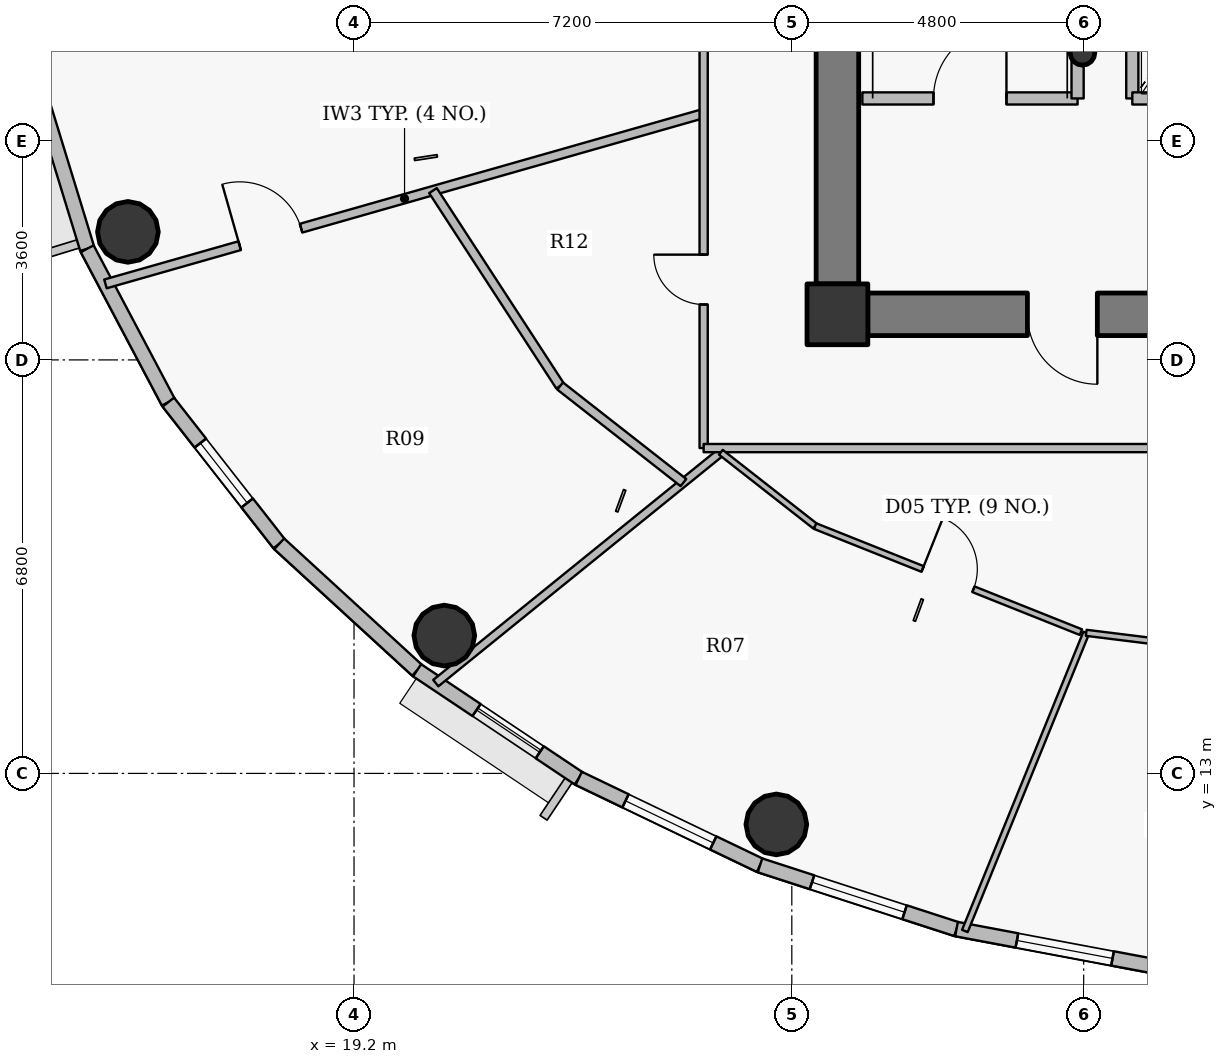
"""IFC4 building model, lengths in metres.
Left out: names, types, materials, properties, quantities, classifications, styles, units other than length and angle.
Written with IfcOpenShell. Run it as: python <this file> out.ifc"""

import sys

from ifc_helpers import new_model, si_unit, direction, frame, frame_2d, origin, origin_2d, place, context, subcontext, project, spatial, rectangle, hollow_circle, extrude, source, transform, mapped, element, fill, save


model = new_model("IFC4")
c1 = context("Model", 3, precision=1e-05, world=origin(), true_north=direction((0.0, 1.0)))
c2 = subcontext(c1, "Body", "Model", "MODEL_VIEW")
j1 = project(units=[si_unit("LENGTHUNIT", "METRE"), si_unit("PLANEANGLEUNIT", "RADIAN")], contexts=[c1])
p1 = place(None, origin())
s1 = spatial("IfcSite", under=j1, at=p1, CompositionType="ELEMENT")
p2 = place(p1, origin())
s2 = spatial("IfcBuilding", under=s1, at=p2, CompositionType="ELEMENT")
p3 = place(p2, frame((0.0, 0.0, 310.5)))
s3 = spatial("IfcBuildingStorey", under=s2, at=p3, CompositionType="ELEMENT", Elevation=310.5)
p4 = place(p3, frame((27.15, 20.55, 0.0), z_axis=(0.0, 0.0, 1.0), x_axis=(1.0, 0.0, 0.0)))
e1 = element("IfcColumn", 1, at=p4, inside=s3, PredefinedType="COLUMN", context=c2, shape_type="SweptSolid", body=[
    extrude(rectangle(XDim=1.0, YDim=1.0, at=origin_2d()), origin(), (0.0, 0.0, 1.0), 3.75),
])
p5 = place(p3, frame((31.18, 24.85, 0.0), z_axis=(0.0, 0.0, 1.0), x_axis=(1.0, 0.0, 0.0)))
e2 = element("IfcColumn", 2, at=p5, inside=s3, PredefinedType="COLUMN", context=c2, shape_type="SweptSolid", body=[
    extrude(hollow_circle(Radius=0.203, WallThickness=0.016, at=origin_2d()), origin(), (0.0, 0.0, 1.0), 3.75),
])
p6 = place(p3, frame((44.35, 20.55, 0.0), z_axis=(0.0, 0.0, 1.0), x_axis=(-1.0, 0.0, 0.0)))
e3 = element("IfcWall", 3, at=p6, inside=s3, PredefinedType="SHEAR", context=c2, shape_type="SweptSolid", body=[
    extrude(rectangle(XDim=16.7, YDim=0.7, at=frame_2d((8.35, 0.0))), origin(), (0.0, 0.0, 1.0), 3.05),
])
p7 = place(p6, frame((12.925, 0.0, 0.0)))
e4 = element("IfcOpeningElement", 4, at=p7, cuts=e3, PredefinedType="OPENING", context=c2, shape_type="SweptSolid", body=[
    extrude(rectangle(XDim=1.15, YDim=2.15, at=origin_2d()), frame((0.575, 0.36, 1.075), z_axis=(0.0, -1.0, 0.0), x_axis=(1.0, 0.0, 0.0)), (0.0, 0.0, 1.0), 0.72),
])
p8 = place(p6, frame((9.1, 0.0, 0.0)))
e5 = element("IfcOpeningElement", 5, at=p8, cuts=e3, PredefinedType="OPENING", context=c2, shape_type="SweptSolid", body=[
    extrude(rectangle(XDim=1.15, YDim=2.15, at=origin_2d()), frame((0.575, 0.36, 1.075), z_axis=(0.0, -1.0, 0.0), x_axis=(1.0, 0.0, 0.0)), (0.0, 0.0, 1.0), 0.72),
])
p9 = place(p3, frame((27.15, 21.05, 0.0), z_axis=(0.0, 0.0, 1.0), x_axis=(0.0, 1.0, 0.0)))
e6 = element("IfcWall", 6, at=p9, inside=s3, PredefinedType="SHEAR", context=c2, shape_type="SweptSolid", body=[
    extrude(rectangle(XDim=11.9, YDim=0.7, at=frame_2d((5.95, 0.0))), origin(), (0.0, 0.0, 1.0), 3.05),
])
for number, where, z_axis, x_axis in (
    (7, (15.481, 21.906, 0.0), (0.0, 0.0, 1.0), (1.0, 0.0, 0.0)),
    (8, (20.685, 15.267, 0.0), (0.0, 0.0, 1.0), (1.0, 0.0, 0.0)),
    (9, (26.146, 12.161, 0.0), (0.0, 0.0, 1.0), (1.0, 0.0, 0.0)),
):
    element("IfcColumn", number, at=place(p3, frame(where, z_axis=z_axis, x_axis=x_axis)), inside=s3, PredefinedType="COLUMN", context=c2, shape_type="SweptSolid", body=[
        extrude(hollow_circle(Radius=0.5, WallThickness=0.032, at=origin_2d()), origin(), (0.0, 0.0, 1.0), 3.75),
    ])
p10 = place(p3, frame((14.812, 21.628, 0.0), z_axis=(0.0, 0.0, 1.0), x_axis=(-0.2931213403, 0.956075248012, 0.0)))
e10 = element("IfcWall", 10, at=p10, inside=s3, PredefinedType="SOLIDWALL", context=c2, shape_type="SweptSolid", body=[
    extrude(rectangle(XDim=2.775, YDim=0.24, at=frame_2d((1.388, 0.0))), origin(), (0.0, 0.0, 1.0), 3.5),
])
p11 = place(p3, frame((16.146, 19.105, 0.0), z_axis=(0.0, 0.0, 1.0), x_axis=(-0.467628269026, 0.883925224218, 0.0)))
e11 = element("IfcWall", 11, at=p11, inside=s3, PredefinedType="SOLIDWALL", context=c2, shape_type="SweptSolid", body=[
    extrude(rectangle(XDim=2.854, YDim=0.24, at=frame_2d((1.427, 0.0))), origin(), (0.0, 0.0, 1.0), 3.5),
])
p12 = place(p3, frame((17.97, 16.775, 0.0), z_axis=(0.0, 0.0, 1.0), x_axis=(-0.616337186556, 0.787482363275, 0.0)))
e12 = element("IfcWall", 12, at=p12, inside=s3, PredefinedType="SOLIDWALL", context=c2, shape_type="SweptSolid", body=[
    extrude(rectangle(XDim=2.958, YDim=0.24, at=frame_2d((1.479, 0.0))), origin(), (0.0, 0.0, 1.0), 3.5),
])
p13 = place(p12, frame((0.854, 0.0, 0.9)))
e13 = element("IfcOpeningElement", 13, at=p13, cuts=e12, PredefinedType="OPENING", context=c2, shape_type="SweptSolid", body=[
    extrude(rectangle(XDim=1.25, YDim=1.65, at=origin_2d()), frame((0.625, 0.13, 0.825), z_axis=(0.0, -1.0, 0.0), x_axis=(1.0, 0.0, 0.0)), (0.0, 0.0, 1.0), 0.26),
])
p14 = place(p3, frame((20.238, 14.696, 0.0), z_axis=(0.0, 0.0, 1.0), x_axis=(-0.737068506972, 0.675818034703, 0.0)))
e14 = element("IfcWall", 14, at=p14, inside=s3, PredefinedType="SOLIDWALL", context=c2, shape_type="SweptSolid", body=[
    extrude(rectangle(XDim=3.077, YDim=0.24, at=frame_2d((1.539, 0.0))), origin(), (0.0, 0.0, 1.0), 3.5),
])
p15 = place(p3, frame((22.896, 12.918, 0.0), z_axis=(0.0, 0.0, 1.0), x_axis=(-0.831250592635, 0.55589787933, 0.0)))
e15 = element("IfcWall", 15, at=p15, inside=s3, PredefinedType="SOLIDWALL", context=c2, shape_type="SweptSolid", body=[
    extrude(rectangle(XDim=3.197, YDim=0.24, at=frame_2d((1.599, 0.0))), origin(), (0.0, 0.0, 1.0), 3.5),
])
p16 = place(p15, frame((0.772, 0.0, 0.9)))
e16 = element("IfcOpeningElement", 16, at=p16, cuts=e15, PredefinedType="OPENING", context=c2, shape_type="SweptSolid", body=[
    extrude(rectangle(XDim=1.25, YDim=1.65, at=origin_2d()), frame((0.625, 0.13, 0.825), z_axis=(0.0, -1.0, 0.0), x_axis=(1.0, 0.0, 0.0)), (0.0, 0.0, 1.0), 0.26),
])
p17 = place(p3, frame((25.877, 11.488, 0.0), z_axis=(0.0, 0.0, 1.0), x_axis=(-0.901573741254, 0.43262546051, 0.0)))
e17 = element("IfcWall", 17, at=p17, inside=s3, PredefinedType="SOLIDWALL", context=c2, shape_type="SweptSolid", body=[
    extrude(rectangle(XDim=3.307, YDim=0.24, at=frame_2d((1.653, 0.0))), origin(), (0.0, 0.0, 1.0), 3.5),
])
p18 = place(p17, frame((0.853, 0.0, 0.9)))
e18 = element("IfcOpeningElement", 18, at=p18, cuts=e17, PredefinedType="OPENING", context=c2, shape_type="SweptSolid", body=[
    extrude(rectangle(XDim=1.6, YDim=1.75, at=origin_2d()), frame((0.8, 0.13, 0.875), z_axis=(0.0, -1.0, 0.0), x_axis=(1.0, 0.0, 0.0)), (0.0, 0.0, 1.0), 0.26),
])
p19 = place(p3, frame((29.109, 10.44, 0.0), z_axis=(0.0, 0.0, 1.0), x_axis=(-0.95123136723, 0.308478339592, 0.0)))
e19 = element("IfcWall", 19, at=p19, inside=s3, PredefinedType="SOLIDWALL", context=c2, shape_type="SweptSolid", body=[
    extrude(rectangle(XDim=3.398, YDim=0.24, at=frame_2d((1.699, 0.0))), origin(), (0.0, 0.0, 1.0), 3.5),
])
p20 = place(p19, frame((0.899, 0.0, 0.9)))
e20 = element("IfcOpeningElement", 20, at=p20, cuts=e19, PredefinedType="OPENING", context=c2, shape_type="SweptSolid", body=[
    extrude(rectangle(XDim=1.6, YDim=1.75, at=origin_2d()), frame((0.8, 0.13, 0.875), z_axis=(0.0, -1.0, 0.0), x_axis=(1.0, 0.0, 0.0)), (0.0, 0.0, 1.0), 0.26),
])
p21 = place(p3, frame((32.511, 9.8, 0.0), z_axis=(0.0, 0.0, 1.0), x_axis=(-0.982782655757, 0.184765395959, 0.0)))
e21 = element("IfcWall", 21, at=p21, inside=s3, PredefinedType="SOLIDWALL", context=c2, shape_type="SweptSolid", body=[
    extrude(rectangle(XDim=3.462, YDim=0.24, at=frame_2d((1.731, 0.0))), origin(), (0.0, 0.0, 1.0), 3.5),
])
p22 = place(p21, frame((0.851, 0.0, 0.9)))
e22 = element("IfcOpeningElement", 22, at=p22, cuts=e21, PredefinedType="OPENING", context=c2, shape_type="SweptSolid", body=[
    extrude(rectangle(XDim=1.6, YDim=1.75, at=origin_2d()), frame((0.8, 0.13, 0.875), z_axis=(0.0, -1.0, 0.0), x_axis=(1.0, 0.0, 0.0)), (0.0, 0.0, 1.0), 0.26),
])
p23 = place(p3, frame((15.112, 21.05, 0.0), z_axis=(0.0, 0.0, 1.0), x_axis=(0.961740695875, 0.273961373004, 0.0)))
e23 = element("IfcWall", 23, at=p23, inside=s3, PredefinedType="PARTITIONING", context=c2, shape_type="SweptSolid", body=[
    extrude(rectangle(XDim=10.229, YDim=0.15, at=frame_2d((5.115, 0.0))), origin(), (0.0, 0.0, 1.0), 2.985),
])
p24 = place(p23, frame((2.295, 0.0, 0.0)))
e24 = element("IfcOpeningElement", 24, at=p24, cuts=e23, PredefinedType="OPENING", context=c2, shape_type="SweptSolid", body=[
    extrude(rectangle(XDim=1.05, YDim=2.15, at=origin_2d()), frame((0.525, 0.085, 1.075), z_axis=(0.0, -1.0, 0.0), x_axis=(1.0, 0.0, 0.0)), (0.0, 0.0, 1.0), 0.17),
])
p25 = place(p3, frame((20.499, 22.584, 0.0), z_axis=(0.0, 0.0, 1.0), x_axis=(0.545422512832, -0.838161250892, 0.0)))
e25 = element("IfcWall", 25, at=p25, inside=s3, PredefinedType="PARTITIONING", context=c2, shape_type="SweptSolid", body=[
    extrude(rectangle(XDim=3.834, YDim=0.15, at=frame_2d((1.917, 0.0))), origin(), (0.0, 0.0, 1.0), 3.5),
])
p26 = place(p3, frame((20.545, 14.485, 0.0), z_axis=(0.0, 0.0, 1.0), x_axis=(0.77715155867, 0.629313479004, 0.0)))
e26 = element("IfcWall", 26, at=p26, inside=s3, PredefinedType="PARTITIONING", context=c2, shape_type="SweptSolid", body=[
    extrude(rectangle(XDim=6.032, YDim=0.135, at=frame_2d((3.016, 0.0))), origin(), (0.0, 0.0, 1.0), 2.985),
])
p27 = place(p3, frame((22.59, 19.371, 0.0), z_axis=(0.0, 0.0, 1.0), x_axis=(0.78729093539, -0.616581692116, 0.0)))
e27 = element("IfcWall", 27, at=p27, inside=s3, PredefinedType="PARTITIONING", context=c2, shape_type="SweptSolid", body=[
    extrude(rectangle(XDim=2.576, YDim=0.15, at=frame_2d((1.288, 0.0))), origin(), (0.0, 0.0, 1.0), 3.035),
])
p28 = place(p3, frame((24.95, 18.35, 0.0), z_axis=(0.0, 0.0, 1.0), x_axis=(0.0, 1.0, 0.0)))
e28 = element("IfcWall", 28, at=p28, inside=s3, PredefinedType="PARTITIONING", context=c2, shape_type="SweptSolid", body=[
    extrude(rectangle(XDim=11.45, YDim=0.135, at=frame_2d((5.725, 0.0))), origin(), (0.0, 0.0, 1.0), 3.035),
])
p29 = place(p28, frame((7.931, 0.0, 0.0)))
e29 = element("IfcOpeningElement", 29, at=p29, cuts=e28, PredefinedType="OPENING", context=c2, shape_type="SweptSolid", body=[
    extrude(rectangle(XDim=1.05, YDim=2.15, at=origin_2d()), frame((0.525, 0.078, 1.075), z_axis=(0.0, -1.0, 0.0), x_axis=(1.0, 0.0, 0.0)), (0.0, 0.0, 1.0), 0.155),
])
p30 = place(p28, frame((2.361, 0.0, 0.0)))
e30 = element("IfcOpeningElement", 30, at=p30, cuts=e28, PredefinedType="OPENING", context=c2, shape_type="SweptSolid", body=[
    extrude(rectangle(XDim=0.82, YDim=2.1, at=origin_2d()), frame((0.41, 0.078, 1.05), z_axis=(0.0, -1.0, 0.0), x_axis=(1.0, 0.0, 0.0)), (0.0, 0.0, 1.0), 0.155),
])
p31 = place(p3, frame((24.95, 18.35, 0.0), z_axis=(0.0, 0.0, 1.0), x_axis=(1.0, 0.0, 0.0)))
e31 = element("IfcWall", 31, at=p31, inside=s3, PredefinedType="PARTITIONING", context=c2, shape_type="SweptSolid", body=[
    extrude(rectangle(XDim=19.311, YDim=0.135, at=frame_2d((9.655, 0.0))), origin(), (0.0, 0.0, 1.0), 3.035),
])
p32 = place(p31, frame((9.319, 0.0, 0.0)))
e32 = element("IfcOpeningElement", 32, at=p32, cuts=e31, PredefinedType="OPENING", context=c2, shape_type="SweptSolid", body=[
    extrude(rectangle(XDim=1.0, YDim=2.15, at=origin_2d()), frame((0.5, 0.078, 1.075), z_axis=(0.0, -1.0, 0.0), x_axis=(1.0, 0.0, 0.0)), (0.0, 0.0, 1.0), 0.155),
])
p33 = place(p3, frame((25.233, 18.281, 0.0), z_axis=(0.0, 0.0, 1.0), x_axis=(0.787345395334, -0.61651214785, 0.0)))
e33 = element("IfcWall", 33, at=p33, inside=s3, PredefinedType="PARTITIONING", context=c2, shape_type="SweptSolid", body=[
    extrude(rectangle(XDim=1.969, YDim=0.1, at=frame_2d((0.985, 0.0))), origin(), (0.0, 0.0, 1.0), 3.5),
])
p34 = place(p3, frame((26.783, 17.067, 0.0), z_axis=(0.0, 0.0, 1.0), x_axis=(0.928809047774, -0.370558703544, 0.0)))
e34 = element("IfcWall", 34, at=p34, inside=s3, PredefinedType="PARTITIONING", context=c2, shape_type="SweptSolid", body=[
    extrude(rectangle(XDim=4.706, YDim=0.1, at=frame_2d((2.353, 0.0))), origin(), (0.0, 0.0, 1.0), 3.035),
])
p35 = place(p34, frame((1.903, 0.0, 0.0)))
e35 = element("IfcOpeningElement", 35, at=p35, cuts=e34, PredefinedType="OPENING", context=c2, shape_type="SweptSolid", body=[
    extrude(rectangle(XDim=0.9, YDim=2.1, at=origin_2d()), frame((0.45, 0.06, 1.05), z_axis=(0.0, -1.0, 0.0), x_axis=(1.0, 0.0, 0.0)), (0.0, 0.0, 1.0), 0.12),
])
p36 = place(p3, frame((27.56, 24.1, 0.0), z_axis=(0.0, 0.0, 1.0), x_axis=(1.0, 0.0, 0.0)))
e36 = element("IfcWall", 36, at=p36, inside=s3, PredefinedType="PARTITIONING", context=c2, shape_type="SweptSolid", body=[
    extrude(rectangle(XDim=3.54, YDim=0.2, at=frame_2d((1.77, 0.0))), origin(), (0.0, 0.0, 1.0), 3.5),
])
p37 = place(p36, frame((1.17, 0.0, 0.0)))
e37 = element("IfcOpeningElement", 37, at=p37, cuts=e36, PredefinedType="OPENING", context=c2, shape_type="SweptSolid", body=[
    extrude(rectangle(XDim=1.2, YDim=2.15, at=origin_2d()), frame((0.6, 0.11, 1.075), z_axis=(0.0, -1.0, 0.0), x_axis=(1.0, 0.0, 0.0)), (0.0, 0.0, 1.0), 0.22),
])
p38 = place(p3, frame((29.246, 10.409, 0.0), z_axis=(0.0, 0.0, 1.0), x_axis=(0.377005355791, 0.926211078375, 0.0)))
e38 = element("IfcWall", 38, at=p38, inside=s3, PredefinedType="PARTITIONING", context=c2, shape_type="SweptSolid", body=[
    extrude(rectangle(XDim=5.294, YDim=0.1, at=frame_2d((2.647, 0.0))), origin(), (0.0, 0.0, 1.0), 2.985),
])
p39 = place(p3, frame((31.1, 24.1, 0.0), z_axis=(0.0, 0.0, 1.0), x_axis=(0.0, 1.0, 0.0)))
e39 = element("IfcWall", 39, at=p39, inside=s3, PredefinedType="PARTITIONING", context=c2, shape_type="SweptSolid", body=[
    extrude(rectangle(XDim=1.44, YDim=0.2, at=frame_2d((0.72, 0.0))), origin(), (0.0, 0.0, 1.0), 3.5),
])
p40 = place(p3, frame((31.242, 15.312, 0.0), z_axis=(0.0, 0.0, 1.0), x_axis=(0.992396501967, -0.123082016895, 0.0)))
e40 = element("IfcWall", 40, at=p40, inside=s3, PredefinedType="PARTITIONING", context=c2, shape_type="SweptSolid", body=[
    extrude(rectangle(XDim=4.794, YDim=0.1, at=frame_2d((2.397, 0.0))), origin(), (0.0, 0.0, 1.0), 3.035),
])
p41 = place(p40, frame((1.947, 0.0, 0.0)))
e41 = element("IfcOpeningElement", 41, at=p41, cuts=e40, PredefinedType="OPENING", context=c2, shape_type="SweptSolid", body=[
    extrude(rectangle(XDim=0.9, YDim=2.1, at=origin_2d()), frame((0.45, 0.06, 1.05), z_axis=(0.0, -1.0, 0.0), x_axis=(1.0, 0.0, 0.0)), (0.0, 0.0, 1.0), 0.12),
])
p42 = place(p3, frame((32.0, 24.1, 0.0), z_axis=(0.0, 0.0, 1.0), x_axis=(0.0, 1.0, 0.0)))
e42 = element("IfcWall", 42, at=p42, inside=s3, PredefinedType="PARTITIONING", context=c2, shape_type="SweptSolid", body=[
    extrude(rectangle(XDim=3.45, YDim=0.2, at=frame_2d((1.725, 0.0))), origin(), (0.0, 0.0, 1.0), 3.5),
])
p43 = place(p3, frame((32.0, 24.1, 0.0), z_axis=(0.0, 0.0, 1.0), x_axis=(1.0, 0.0, 0.0)))
e43 = element("IfcWall", 43, at=p43, inside=s3, PredefinedType="PARTITIONING", context=c2, shape_type="SweptSolid", body=[
    extrude(rectangle(XDim=1.9, YDim=0.2, at=frame_2d((0.95, 0.0))), origin(), (0.0, 0.0, 1.0), 3.085),
])
p44 = place(p43, frame((0.375, 0.0, 0.0)))
e44 = element("IfcOpeningElement", 44, at=p44, cuts=e43, PredefinedType="OPENING", context=c2, shape_type="SweptSolid", body=[
    extrude(rectangle(XDim=1.15, YDim=2.15, at=origin_2d()), frame((0.575, 0.11, 1.075), z_axis=(0.0, -1.0, 0.0), x_axis=(1.0, 0.0, 0.0)), (0.0, 0.0, 1.0), 0.22),
])
p45 = place(p3, frame((26.8, 21.04, 0.0), z_axis=(0.0, 0.0, 1.0), x_axis=(0.0, -1.0, 0.0)))
e45 = element("IfcWall", 45, at=p45, inside=s3, PredefinedType="PARTITIONING", context=c2, shape_type="SweptSolid", body=[
    extrude(rectangle(XDim=0.84, YDim=0.135, at=frame_2d((0.42, 0.0))), origin(), (0.0, 0.0, 1.0), 3.035),
])
p46 = place(p3, frame((27.107, 20.2, 0.0), z_axis=(0.0, 0.0, 1.0), x_axis=(1.0, 0.0, 0.0)))
e46 = element("IfcWall", 46, at=p46, inside=s3, PredefinedType="PARTITIONING", context=c2, shape_type="SweptSolid", body=[
    extrude(rectangle(XDim=0.532, YDim=0.135, at=frame_2d((0.266, 0.0))), origin(), (0.0, 0.0, 1.0), 3.035),
])
m1 = source(origin(), c2, "Body", "SweptSolid", [
    extrude(rectangle(XDim=1.25, YDim=1.65, at=origin_2d()), frame((0.625, 0.03, 0.825), z_axis=(0.0, -1.0, 0.0), x_axis=(1.0, 0.0, 0.0)), (0.0, 0.0, 1.0), 0.06),
])
p47 = place(p13, origin())
e47 = element("IfcWindow", 47, at=p47, inside=s3, PartitioningType="SINGLE_PANEL", PredefinedType="WINDOW", context=c2, shape_type="MappedRepresentation", body=[
    mapped(m1, transform((0.0, 0.0, 0.0), x_axis=(1.0, 0.0, 0.0), y_axis=(0.0, 1.0, 0.0), z_axis=(0.0, 0.0, 1.0), scale=1.0)),
])
fill(e13, e47)
p48 = place(p16, origin())
e48 = element("IfcWindow", 48, at=p48, inside=s3, PartitioningType="SINGLE_PANEL", PredefinedType="WINDOW", context=c2, shape_type="MappedRepresentation", body=[
    mapped(m1, transform((0.0, 0.0, 0.0), x_axis=(1.0, 0.0, 0.0), y_axis=(0.0, 1.0, 0.0), z_axis=(0.0, 0.0, 1.0), scale=1.0)),
])
fill(e16, e48)
m2 = source(origin(), c2, "Body", "SweptSolid", [
    extrude(rectangle(XDim=1.6, YDim=1.75, at=origin_2d()), frame((0.8, 0.03, 0.875), z_axis=(0.0, -1.0, 0.0), x_axis=(1.0, 0.0, 0.0)), (0.0, 0.0, 1.0), 0.06),
])
p49 = place(p18, origin())
e49 = element("IfcWindow", 49, at=p49, inside=s3, PartitioningType="DOUBLE_PANEL_VERTICAL", PredefinedType="WINDOW", context=c2, shape_type="MappedRepresentation", body=[
    mapped(m2, transform((0.0, 0.0, 0.0), x_axis=(1.0, 0.0, 0.0), y_axis=(0.0, 1.0, 0.0), z_axis=(0.0, 0.0, 1.0), scale=1.0)),
])
fill(e18, e49)
p50 = place(p20, origin())
e50 = element("IfcWindow", 50, at=p50, inside=s3, PartitioningType="DOUBLE_PANEL_VERTICAL", PredefinedType="WINDOW", context=c2, shape_type="MappedRepresentation", body=[
    mapped(m2, transform((0.0, 0.0, 0.0), x_axis=(1.0, 0.0, 0.0), y_axis=(0.0, 1.0, 0.0), z_axis=(0.0, 0.0, 1.0), scale=1.0)),
])
fill(e20, e50)
p51 = place(p22, origin())
e51 = element("IfcWindow", 51, at=p51, inside=s3, PartitioningType="DOUBLE_PANEL_VERTICAL", PredefinedType="WINDOW", context=c2, shape_type="MappedRepresentation", body=[
    mapped(m2, transform((0.0, 0.0, 0.0), x_axis=(1.0, 0.0, 0.0), y_axis=(0.0, 1.0, 0.0), z_axis=(0.0, 0.0, 1.0), scale=1.0)),
])
fill(e22, e51)
m3 = source(origin(), c2, "Body", "SweptSolid", [
    extrude(rectangle(XDim=1.15, YDim=2.15, at=origin_2d()), frame((0.575, 0.025, 1.075), z_axis=(0.0, -1.0, 0.0), x_axis=(1.0, 0.0, 0.0)), (0.0, 0.0, 1.0), 0.05),
])
p52 = place(p7, origin())
e52 = element("IfcDoor", 52, at=p52, inside=s3, OperationType="SINGLE_SWING_LEFT", PredefinedType="DOOR", context=c2, shape_type="MappedRepresentation", body=[
    mapped(m3, transform((0.0, 0.0, 0.0), x_axis=(1.0, 0.0, 0.0), y_axis=(0.0, 1.0, 0.0), z_axis=(0.0, 0.0, 1.0), scale=1.0)),
])
fill(e4, e52)
m4 = source(origin(), c2, "Body", "SweptSolid", [
    extrude(rectangle(XDim=1.2, YDim=2.15, at=origin_2d()), frame((0.6, 0.025, 1.075), z_axis=(0.0, -1.0, 0.0), x_axis=(1.0, 0.0, 0.0)), (0.0, 0.0, 1.0), 0.05),
])
p53 = place(p37, origin())
e53 = element("IfcDoor", 53, at=p53, inside=s3, OperationType="SINGLE_SWING_RIGHT", PredefinedType="DOOR", context=c2, shape_type="MappedRepresentation", body=[
    mapped(m4, transform((0.0, 0.0, 0.0), x_axis=(1.0, 0.0, 0.0), y_axis=(0.0, 1.0, 0.0), z_axis=(0.0, 0.0, 1.0), scale=1.0)),
])
fill(e37, e53)
m5 = source(origin(), c2, "Body", "SweptSolid", [
    extrude(rectangle(XDim=0.9, YDim=2.1, at=origin_2d()), frame((0.45, 0.025, 1.05), z_axis=(0.0, -1.0, 0.0), x_axis=(1.0, 0.0, 0.0)), (0.0, 0.0, 1.0), 0.05),
])
p54 = place(p35, origin())
e54 = element("IfcDoor", 54, at=p54, inside=s3, OperationType="SINGLE_SWING_LEFT", PredefinedType="DOOR", context=c2, shape_type="MappedRepresentation", body=[
    mapped(m5, transform((0.0, 0.0, 0.0), x_axis=(1.0, 0.0, 0.0), y_axis=(0.0, 1.0, 0.0), z_axis=(0.0, 0.0, 1.0), scale=1.0)),
])
fill(e35, e54)
m6 = source(origin(), c2, "Body", "SweptSolid", [
    extrude(rectangle(XDim=0.82, YDim=2.1, at=origin_2d()), frame((0.41, 0.025, 1.05), z_axis=(0.0, -1.0, 0.0), x_axis=(1.0, 0.0, 0.0)), (0.0, 0.0, 1.0), 0.05),
])
p55 = place(p30, origin())
e55 = element("IfcDoor", 55, at=p55, inside=s3, OperationType="SINGLE_SWING_RIGHT", PredefinedType="DOOR", context=c2, shape_type="MappedRepresentation", body=[
    mapped(m6, transform((0.0, 0.0, 0.0), x_axis=(1.0, 0.0, 0.0), y_axis=(0.0, 1.0, 0.0), z_axis=(0.0, 0.0, 1.0), scale=1.0)),
])
fill(e30, e55)
m7 = source(origin(), c2, "Body", "SweptSolid", [
    extrude(rectangle(XDim=1.05, YDim=2.15, at=origin_2d()), frame((0.525, 0.025, 1.075), z_axis=(0.0, -1.0, 0.0), x_axis=(1.0, 0.0, 0.0)), (0.0, 0.0, 1.0), 0.05),
])
p56 = place(p24, origin())
e56 = element("IfcDoor", 56, at=p56, inside=s3, OperationType="SINGLE_SWING_LEFT", PredefinedType="DOOR", context=c2, shape_type="MappedRepresentation", body=[
    mapped(m7, transform((0.0, 0.0, 0.0), x_axis=(1.0, 0.0, 0.0), y_axis=(0.0, 1.0, 0.0), z_axis=(0.0, 0.0, 1.0), scale=1.0)),
])
fill(e24, e56)
save(model, sys.argv[1])
